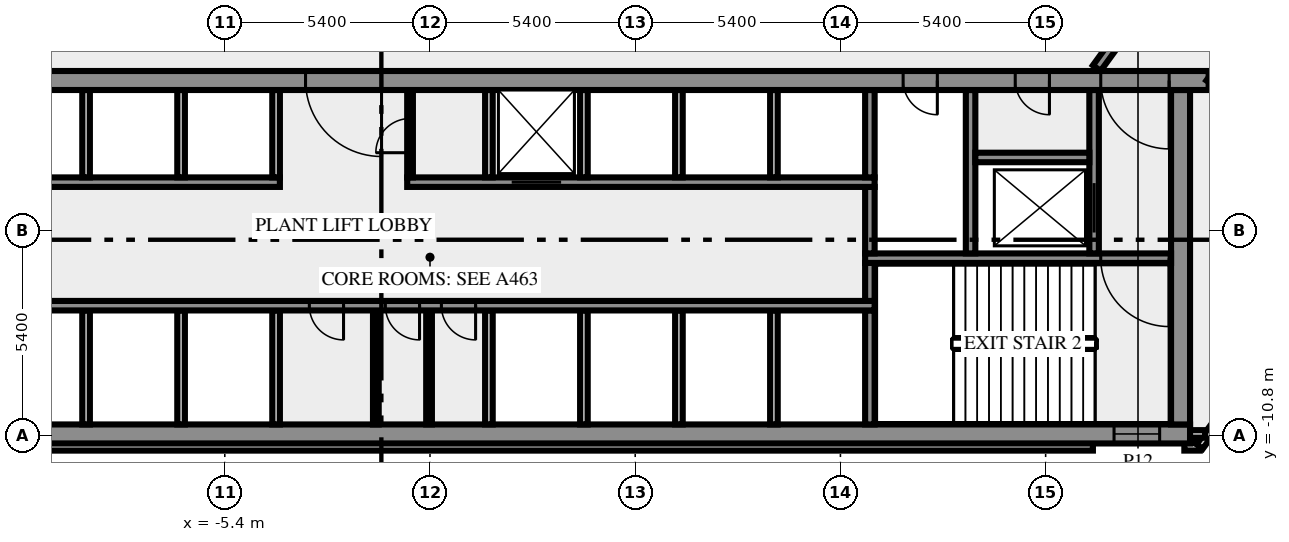
"""IFC4 building model, lengths in metres.
Left out: names, types, materials, properties, quantities, classifications, styles, units other than length and angle.
Written with IfcOpenShell. Run it as: python <this file> out.ifc"""

import sys

from ifc_helpers import new_model, si_unit, direction, frame, frame_2d, origin, place, context, subcontext, project, spatial, rectangle, extrude, element, fill, save


model = new_model("IFC4")
c1 = context("Model", 3, precision=1e-05, world=origin(), true_north=direction((0.0, 1.0)))
c2 = subcontext(c1, "Body", "Model", "MODEL_VIEW")
j1 = project(units=[si_unit("LENGTHUNIT", "METRE"), si_unit("PLANEANGLEUNIT", "RADIAN")], contexts=[c1])
p1 = place(None, origin())
s1 = spatial("IfcSite", under=j1, at=p1, CompositionType="ELEMENT")
p2 = place(p1, origin())
s2 = spatial("IfcBuilding", under=s1, at=p2, CompositionType="ELEMENT")
p3 = place(p2, frame((0.0, 0.0, 79.0)))
s3 = spatial("IfcBuildingStorey", under=s2, at=p3, CompositionType="ELEMENT", Elevation=79.0)
p4 = place(p3, frame((-17.444, -11.088, 0.0), z_axis=(0.0, 0.0, 1.0), x_axis=(1.0, 0.0, 0.0)))
e1 = element("IfcWall", 1, at=p4, inside=s3, PredefinedType="SOLIDWALL", context=c2, shape_type="SweptSolid", body=[
    extrude(rectangle(XDim=34.888, YDim=0.2, at=frame_2d((17.444, 0.0))), origin(), (0.0, 0.0, 1.0), 5.65),
])
p5 = place(p3, frame((19.85, -11.088, 0.0), z_axis=(0.0, 0.0, 1.0), x_axis=(1.0, 0.0, 0.0)))
e2 = element("IfcWall", 2, at=p5, inside=s3, PredefinedType="SOLIDWALL", context=c2, shape_type="SweptSolid", body=[
    extrude(rectangle(XDim=0.406, YDim=0.2, at=frame_2d((0.203, 0.0))), origin(), (0.0, 0.0, 1.0), 5.65),
])
p6 = place(p3, frame((20.253, -11.083, 0.0), z_axis=(0.0, 0.0, 1.0), x_axis=(0.587766567315, 0.809030569476, 0.0)))
e3 = element("IfcWall", 3, at=p6, inside=s3, PredefinedType="SOLIDWALL", context=c2, shape_type="SweptSolid", body=[
    extrude(rectangle(XDim=2.688, YDim=0.2, at=frame_2d((1.344, 0.0))), origin(), (0.0, 0.0, 1.0), 5.65),
])
p7 = place(p3, frame((19.98, -10.75, 0.0), z_axis=(0.0, 0.0, 1.0), x_axis=(1.0, 0.0, 0.0)))
e4 = element("IfcWall", 4, at=p7, inside=s3, PredefinedType="SOLIDWALL", context=c2, shape_type="SweptSolid", body=[
    extrude(rectangle(XDim=0.417, YDim=0.2, at=frame_2d((0.208, 0.0))), origin(), (0.0, 0.0, 1.0), 5.65),
])
p8 = place(p3, frame((-20.0, -10.75, 0.0), z_axis=(0.0, 0.0, 1.0), x_axis=(1.0, 0.0, 0.0)))
e5 = element("IfcWall", 5, at=p8, inside=s3, PredefinedType="SHEAR", context=c2, shape_type="SweptSolid", body=[
    extrude(rectangle(XDim=40.0, YDim=0.5, at=frame_2d((20.0, 0.0))), origin(), (0.0, 0.0, 1.0), 5.65),
])
p9 = place(p8, frame((0.8, 0.0, 1.0)))
e6 = element("IfcOpeningElement", 6, at=p9, cuts=e5, PredefinedType="OPENING", context=c2, shape_type="SweptSolid", body=[
    extrude(rectangle(XDim=1.2, YDim=1.2, at=frame_2d((0.6, 0.6))), frame((0.0, 0.26, 0.0), z_axis=(0.0, -1.0, 0.0), x_axis=(1.0, 0.0, 0.0)), (0.0, 0.0, 1.0), 0.52),
])
p10 = place(p8, frame((38.0, 0.0, 1.0)))
e7 = element("IfcOpeningElement", 7, at=p10, cuts=e5, PredefinedType="OPENING", context=c2, shape_type="SweptSolid", body=[
    extrude(rectangle(XDim=1.2, YDim=1.2, at=frame_2d((0.6, 0.6))), frame((0.0, 0.26, 0.0), z_axis=(0.0, -1.0, 0.0), x_axis=(1.0, 0.0, 0.0)), (0.0, 0.0, 1.0), 0.52),
])
for number, where, z_axis, x_axis in (
    (8, (-9.05, -10.5, 0.0), (0.0, 0.0, 1.0), (0.0, 1.0, 0.0)),
    (9, (-6.55, -10.5, 0.0), (0.0, 0.0, 1.0), (0.0, 1.0, 0.0)),
    (10, (-4.05, -10.5, 0.0), (0.0, 0.0, 1.0), (0.0, 1.0, 0.0)),
):
    element("IfcWall", number, at=place(p3, frame(where, z_axis=z_axis, x_axis=x_axis)), inside=s3, PredefinedType="SOLIDWALL", context=c2, shape_type="SweptSolid", body=[
        extrude(rectangle(XDim=3.0, YDim=0.2, at=frame_2d((1.5, 0.0))), origin(), (0.0, 0.0, 1.0), 5.65),
    ])
for number, where, z_axis, x_axis in (
    (11, (-1.425, -10.5, 0.0), (0.0, 0.0, 1.0), (0.0, 1.0, 0.0)),
    (12, (-0.025, -10.5, 0.0), (0.0, 0.0, 1.0), (0.0, 1.0, 0.0)),
):
    element("IfcWall", number, at=place(p3, frame(where, z_axis=z_axis, x_axis=x_axis)), inside=s3, PredefinedType="PARTITIONING", context=c2, shape_type="SweptSolid", body=[
        extrude(rectangle(XDim=3.0, YDim=0.15, at=frame_2d((1.5, 0.0))), origin(), (0.0, 0.0, 1.0), 5.65),
    ])
for number, where, z_axis, x_axis in (
    (13, (1.55, -10.5, 0.0), (0.0, 0.0, 1.0), (0.0, 1.0, 0.0)),
    (14, (4.05, -10.5, 0.0), (0.0, 0.0, 1.0), (0.0, 1.0, 0.0)),
    (15, (6.55, -10.5, 0.0), (0.0, 0.0, 1.0), (0.0, 1.0, 0.0)),
    (16, (9.05, -10.5, 0.0), (0.0, 0.0, 1.0), (0.0, 1.0, 0.0)),
):
    element("IfcWall", number, at=place(p3, frame(where, z_axis=z_axis, x_axis=x_axis)), inside=s3, PredefinedType="SOLIDWALL", context=c2, shape_type="SweptSolid", body=[
        extrude(rectangle(XDim=3.0, YDim=0.2, at=frame_2d((1.5, 0.0))), origin(), (0.0, 0.0, 1.0), 5.65),
    ])
p11 = place(p3, frame((11.575, -10.5, 0.0), z_axis=(0.0, 0.0, 1.0), x_axis=(0.0, 1.0, 0.0)))
e17 = element("IfcWall", 17, at=p11, inside=s3, PredefinedType="SHEAR", context=c2, shape_type="SweptSolid", body=[
    extrude(rectangle(XDim=3.0, YDim=0.25, at=frame_2d((1.5, 0.0))), origin(), (0.0, 0.0, 1.0), 5.65),
])
p12 = place(p3, frame((19.75, -10.5, 0.0), z_axis=(0.0, 0.0, 1.0), x_axis=(0.0, 1.0, 0.0)))
e18 = element("IfcWall", 18, at=p12, inside=s3, PredefinedType="SHEAR", context=c2, shape_type="SweptSolid", body=[
    extrude(rectangle(XDim=8.8, YDim=0.5, at=frame_2d((4.4, 0.0))), origin(), (0.0, 0.0, 1.0), 5.65),
])
p13 = place(p3, frame((11.7, -7.375, 0.0), z_axis=(0.0, 0.0, 1.0), x_axis=(-1.0, 0.0, 0.0)))
e19 = element("IfcWall", 19, at=p13, inside=s3, PredefinedType="SHEAR", context=c2, shape_type="SweptSolid", body=[
    extrude(rectangle(XDim=23.4, YDim=0.25, at=frame_2d((11.7, 0.0))), origin(), (0.0, 0.0, 1.0), 5.65),
])
p14 = place(p13, frame((13.975, 0.0, 0.0)))
e20 = element("IfcOpeningElement", 20, at=p14, cuts=e19, PredefinedType="OPENING", context=c2, shape_type="SweptSolid", body=[
    extrude(rectangle(XDim=0.9, YDim=2.1, at=frame_2d((0.45, 1.05))), frame((0.0, 0.135, 0.0), z_axis=(0.0, -1.0, 0.0), x_axis=(1.0, 0.0, 0.0)), (0.0, 0.0, 1.0), 0.27),
])
p15 = place(p13, frame((11.975, 0.0, 0.0)))
e21 = element("IfcOpeningElement", 21, at=p15, cuts=e19, PredefinedType="OPENING", context=c2, shape_type="SweptSolid", body=[
    extrude(rectangle(XDim=0.9, YDim=2.1, at=frame_2d((0.45, 1.05))), frame((0.0, 0.135, 0.0), z_axis=(0.0, -1.0, 0.0), x_axis=(1.0, 0.0, 0.0)), (0.0, 0.0, 1.0), 0.27),
])
p16 = place(p13, frame((10.5, 0.0, 0.0)))
e22 = element("IfcOpeningElement", 22, at=p16, cuts=e19, PredefinedType="OPENING", context=c2, shape_type="SweptSolid", body=[
    extrude(rectangle(XDim=0.9, YDim=2.1, at=frame_2d((0.45, 1.05))), frame((0.0, 0.135, 0.0), z_axis=(0.0, -1.0, 0.0), x_axis=(1.0, 0.0, 0.0)), (0.0, 0.0, 1.0), 0.27),
])
p17 = place(p3, frame((11.575, -7.25, 0.0), z_axis=(0.0, 0.0, 1.0), x_axis=(0.0, 1.0, 0.0)))
e23 = element("IfcWall", 23, at=p17, inside=s3, PredefinedType="SHEAR", context=c2, shape_type="SweptSolid", body=[
    extrude(rectangle(XDim=1.0, YDim=0.25, at=frame_2d((0.5, 0.0))), origin(), (0.0, 0.0, 1.0), 5.65),
])
p18 = place(p3, frame((19.5, -6.125, 0.0), z_axis=(0.0, 0.0, 1.0), x_axis=(-1.0, 0.0, 0.0)))
e24 = element("IfcWall", 24, at=p18, inside=s3, PredefinedType="SHEAR", context=c2, shape_type="SweptSolid", body=[
    extrude(rectangle(XDim=8.05, YDim=0.25, at=frame_2d((4.025, 0.0))), origin(), (0.0, 0.0, 1.0), 5.65),
])
p19 = place(p18, frame((0.05, 0.0, 0.0)))
e25 = element("IfcOpeningElement", 25, at=p19, cuts=e24, PredefinedType="OPENING", context=c2, shape_type="SweptSolid", body=[
    extrude(rectangle(XDim=1.8, YDim=2.1, at=frame_2d((0.9, 1.05))), frame((0.0, 0.135, 0.0), z_axis=(0.0, -1.0, 0.0), x_axis=(1.0, 0.0, 0.0)), (0.0, 0.0, 1.0), 0.27),
])
p20 = place(p3, frame((11.575, -6.0, 0.0), z_axis=(0.0, 0.0, 1.0), x_axis=(0.0, 1.0, 0.0)))
e26 = element("IfcWall", 26, at=p20, inside=s3, PredefinedType="SHEAR", context=c2, shape_type="SweptSolid", body=[
    extrude(rectangle(XDim=1.75, YDim=0.25, at=frame_2d((0.875, 0.0))), origin(), (0.0, 0.0, 1.0), 5.65),
])
p21 = place(p3, frame((14.225, -6.0, 0.0), z_axis=(0.0, 0.0, 1.0), x_axis=(0.0, 1.0, 0.0)))
e27 = element("IfcWall", 27, at=p21, inside=s3, PredefinedType="SHEAR", context=c2, shape_type="SweptSolid", body=[
    extrude(rectangle(XDim=4.3, YDim=0.25, at=frame_2d((2.15, 0.0))), origin(), (0.0, 0.0, 1.0), 5.65),
])
p22 = place(p3, frame((17.475, -6.0, 0.0), z_axis=(0.0, 0.0, 1.0), x_axis=(0.0, 1.0, 0.0)))
e28 = element("IfcWall", 28, at=p22, inside=s3, PredefinedType="SHEAR", context=c2, shape_type="SweptSolid", body=[
    extrude(rectangle(XDim=4.3, YDim=0.25, at=frame_2d((2.15, 0.0))), origin(), (0.0, 0.0, 1.0), 5.65),
])
p23 = place(p22, frame((0.55, 0.0, 0.0)))
e29 = element("IfcOpeningElement", 29, at=p23, cuts=e28, PredefinedType="OPENING", context=c2, shape_type="SweptSolid", body=[
    extrude(rectangle(XDim=1.3, YDim=2.1, at=frame_2d((0.65, 1.05))), frame((0.0, 0.135, 0.0), z_axis=(0.0, -1.0, 0.0), x_axis=(1.0, 0.0, 0.0)), (0.0, 0.0, 1.0), 0.27),
])
p24 = place(p3, frame((-11.7, -4.125, 0.0), z_axis=(0.0, 0.0, 1.0), x_axis=(1.0, 0.0, 0.0)))
e30 = element("IfcWall", 30, at=p24, inside=s3, PredefinedType="SHEAR", context=c2, shape_type="SweptSolid", body=[
    extrude(rectangle(XDim=7.75, YDim=0.25, at=frame_2d((3.875, 0.0))), origin(), (0.0, 0.0, 1.0), 5.65),
])
p25 = place(p3, frame((-0.6, -4.125, 0.0), z_axis=(0.0, 0.0, 1.0), x_axis=(1.0, 0.0, 0.0)))
e31 = element("IfcWall", 31, at=p25, inside=s3, PredefinedType="SHEAR", context=c2, shape_type="SweptSolid", body=[
    extrude(rectangle(XDim=12.3, YDim=0.25, at=frame_2d((6.15, 0.0))), origin(), (0.0, 0.0, 1.0), 5.65),
])
p26 = place(p25, frame((2.75, 0.0, 0.0)))
e32 = element("IfcOpeningElement", 32, at=p26, cuts=e31, PredefinedType="OPENING", context=c2, shape_type="SweptSolid", body=[
    extrude(rectangle(XDim=1.3, YDim=2.1, at=frame_2d((0.65, 1.05))), frame((0.0, 0.135, 0.0), z_axis=(0.0, -1.0, 0.0), x_axis=(1.0, 0.0, 0.0)), (0.0, 0.0, 1.0), 0.27),
])
for number, where, z_axis, x_axis in (
    (33, (-9.05, -4.0, 0.0), (0.0, 0.0, 1.0), (0.0, 1.0, 0.0)),
    (34, (-6.55, -4.0, 0.0), (0.0, 0.0, 1.0), (0.0, 1.0, 0.0)),
    (35, (-4.05, -4.0, 0.0), (0.0, 0.0, 1.0), (0.0, 1.0, 0.0)),
):
    element("IfcWall", number, at=place(p3, frame(where, z_axis=z_axis, x_axis=x_axis)), inside=s3, PredefinedType="SOLIDWALL", context=c2, shape_type="SweptSolid", body=[
        extrude(rectangle(XDim=2.3, YDim=0.2, at=frame_2d((1.15, 0.0))), origin(), (0.0, 0.0, 1.0), 5.65),
    ])
p27 = place(p3, frame((-0.525, -4.0, 0.0), z_axis=(0.0, 0.0, 1.0), x_axis=(0.0, 1.0, 0.0)))
e36 = element("IfcWall", 36, at=p27, inside=s3, PredefinedType="PARTITIONING", context=c2, shape_type="SweptSolid", body=[
    extrude(rectangle(XDim=2.3, YDim=0.15, at=frame_2d((1.15, 0.0))), origin(), (0.0, 0.0, 1.0), 5.65),
])
p28 = place(p27, frame((0.65, 0.0, 0.0)))
e37 = element("IfcOpeningElement", 37, at=p28, cuts=e36, PredefinedType="OPENING", context=c2, shape_type="SweptSolid", body=[
    extrude(rectangle(XDim=0.9, YDim=2.1, at=frame_2d((0.45, 1.05))), frame((0.0, 0.085, 0.0), z_axis=(0.0, -1.0, 0.0), x_axis=(1.0, 0.0, 0.0)), (0.0, 0.0, 1.0), 0.17),
])
for number, where, z_axis, x_axis in (
    (38, (1.55, -4.0, 0.0), (0.0, 0.0, 1.0), (0.0, 1.0, 0.0)),
    (39, (4.05, -4.0, 0.0), (0.0, 0.0, 1.0), (0.0, 1.0, 0.0)),
    (40, (6.55, -4.0, 0.0), (0.0, 0.0, 1.0), (0.0, 1.0, 0.0)),
    (41, (9.05, -4.0, 0.0), (0.0, 0.0, 1.0), (0.0, 1.0, 0.0)),
):
    element("IfcWall", number, at=place(p3, frame(where, z_axis=z_axis, x_axis=x_axis)), inside=s3, PredefinedType="SOLIDWALL", context=c2, shape_type="SweptSolid", body=[
        extrude(rectangle(XDim=2.3, YDim=0.2, at=frame_2d((1.15, 0.0))), origin(), (0.0, 0.0, 1.0), 5.65),
    ])
p29 = place(p3, frame((11.575, -4.0, 0.0), z_axis=(0.0, 0.0, 1.0), x_axis=(0.0, 1.0, 0.0)))
e42 = element("IfcWall", 42, at=p29, inside=s3, PredefinedType="SHEAR", context=c2, shape_type="SweptSolid", body=[
    extrude(rectangle(XDim=2.3, YDim=0.25, at=frame_2d((1.15, 0.0))), origin(), (0.0, 0.0, 1.0), 5.65),
])
p30 = place(p3, frame((14.35, -3.475, 0.0), z_axis=(0.0, 0.0, 1.0), x_axis=(1.0, 0.0, 0.0)))
e43 = element("IfcWall", 43, at=p30, inside=s3, PredefinedType="SHEAR", context=c2, shape_type="SweptSolid", body=[
    extrude(rectangle(XDim=3.0, YDim=0.25, at=frame_2d((1.5, 0.0))), origin(), (0.0, 0.0, 1.0), 5.65),
])
p31 = place(p3, frame((20.49, -1.45, 0.0), z_axis=(0.0, 0.0, 1.0), x_axis=(-1.0, 0.0, 0.0)))
e44 = element("IfcWall", 44, at=p31, inside=s3, PredefinedType="SHEAR", context=c2, shape_type="SweptSolid", body=[
    extrude(rectangle(XDim=40.98, YDim=0.5, at=frame_2d((20.49, 0.0))), origin(), (0.0, 0.0, 1.0), 5.65),
])
p32 = place(p31, frame((38.14, 0.0, 0.0)))
e45 = element("IfcOpeningElement", 45, at=p32, cuts=e44, PredefinedType="OPENING", context=c2, shape_type="SweptSolid", body=[
    extrude(rectangle(XDim=1.8, YDim=2.1, at=frame_2d((0.9, 1.05))), frame((0.0, 0.26, 0.0), z_axis=(0.0, -1.0, 0.0), x_axis=(1.0, 0.0, 0.0)), (0.0, 0.0, 1.0), 0.52),
])
p33 = place(p31, frame((36.728, 0.0, 0.0)))
e46 = element("IfcOpeningElement", 46, at=p33, cuts=e44, PredefinedType="OPENING", context=c2, shape_type="SweptSolid", body=[
    extrude(rectangle(XDim=0.8, YDim=2.1, at=frame_2d((0.4, 1.05))), frame((0.0, 0.26, 0.0), z_axis=(0.0, -1.0, 0.0), x_axis=(1.0, 0.0, 0.0)), (0.0, 0.0, 1.0), 0.52),
])
p34 = place(p31, frame((35.153, 0.0, 0.0)))
e47 = element("IfcOpeningElement", 47, at=p34, cuts=e44, PredefinedType="OPENING", context=c2, shape_type="SweptSolid", body=[
    extrude(rectangle(XDim=0.8, YDim=2.1, at=frame_2d((0.4, 1.05))), frame((0.0, 0.26, 0.0), z_axis=(0.0, -1.0, 0.0), x_axis=(1.0, 0.0, 0.0)), (0.0, 0.0, 1.0), 0.52),
])
p35 = place(p31, frame((32.94, 0.0, 0.0)))
e48 = element("IfcOpeningElement", 48, at=p35, cuts=e44, PredefinedType="OPENING", context=c2, shape_type="SweptSolid", body=[
    extrude(rectangle(XDim=0.9, YDim=2.1, at=frame_2d((0.45, 1.05))), frame((0.0, 0.26, 0.0), z_axis=(0.0, -1.0, 0.0), x_axis=(1.0, 0.0, 0.0)), (0.0, 0.0, 1.0), 0.52),
])
p36 = place(p31, frame((21.765, 0.0, 0.0)))
e49 = element("IfcOpeningElement", 49, at=p36, cuts=e44, PredefinedType="OPENING", context=c2, shape_type="SweptSolid", body=[
    extrude(rectangle(XDim=2.0, YDim=2.1, at=frame_2d((1.0, 1.05))), frame((0.0, 0.26, 0.0), z_axis=(0.0, -1.0, 0.0), x_axis=(1.0, 0.0, 0.0)), (0.0, 0.0, 1.0), 0.52),
])
p37 = place(p31, frame((7.14, 0.0, 0.0)))
e50 = element("IfcOpeningElement", 50, at=p37, cuts=e44, PredefinedType="OPENING", context=c2, shape_type="SweptSolid", body=[
    extrude(rectangle(XDim=0.9, YDim=2.1, at=frame_2d((0.45, 1.05))), frame((0.0, 0.26, 0.0), z_axis=(0.0, -1.0, 0.0), x_axis=(1.0, 0.0, 0.0)), (0.0, 0.0, 1.0), 0.52),
])
p38 = place(p31, frame((4.19, 0.0, 0.0)))
e51 = element("IfcOpeningElement", 51, at=p38, cuts=e44, PredefinedType="OPENING", context=c2, shape_type="SweptSolid", body=[
    extrude(rectangle(XDim=0.9, YDim=2.1, at=frame_2d((0.45, 1.05))), frame((0.0, 0.26, 0.0), z_axis=(0.0, -1.0, 0.0), x_axis=(1.0, 0.0, 0.0)), (0.0, 0.0, 1.0), 0.52),
])
p39 = place(p31, frame((1.04, 0.0, 0.0)))
e52 = element("IfcOpeningElement", 52, at=p39, cuts=e44, PredefinedType="OPENING", context=c2, shape_type="SweptSolid", body=[
    extrude(rectangle(XDim=1.8, YDim=2.1, at=frame_2d((0.9, 1.05))), frame((0.0, 0.26, 0.0), z_axis=(0.0, -1.0, 0.0), x_axis=(1.0, 0.0, 0.0)), (0.0, 0.0, 1.0), 0.52),
])
p40 = place(p3, frame((40.584, 26.078, 0.0), z_axis=(0.0, 0.0, 1.0), x_axis=(-0.587782727964, -0.809018828401, 0.0)))
e53 = element("IfcWall", 53, at=p40, inside=s3, PredefinedType="SOLIDWALL", context=c2, shape_type="SweptSolid", body=[
    extrude(rectangle(XDim=34.117, YDim=0.25, at=frame_2d((17.058, 0.0))), origin(), (0.0, 0.0, 1.0), 5.65),
])
p41 = place(p40, frame((22.951, 0.0, 0.0)))
e54 = element("IfcOpeningElement", 54, at=p41, cuts=e53, PredefinedType="OPENING", context=c2, shape_type="SweptSolid", body=[
    extrude(rectangle(XDim=1.2, YDim=2.1, at=frame_2d((0.6, 1.05))), frame((0.0, 0.135, 0.0), z_axis=(0.0, -1.0, 0.0), x_axis=(1.0, 0.0, 0.0)), (0.0, 0.0, 1.0), 0.27),
])
p42 = place(p40, frame((10.749, 0.0, 0.0)))
e55 = element("IfcOpeningElement", 55, at=p42, cuts=e53, PredefinedType="OPENING", context=c2, shape_type="SweptSolid", body=[
    extrude(rectangle(XDim=1.8, YDim=2.1, at=frame_2d((0.9, 1.05))), frame((0.0, 0.135, 0.0), z_axis=(0.0, -1.0, 0.0), x_axis=(1.0, 0.0, 0.0)), (0.0, 0.0, 1.0), 0.27),
])
p43 = place(p3, frame((17.545, -1.125, 0.0), z_axis=(0.0, 0.0, 1.0), x_axis=(0.587787785895, 0.809015153599, 0.0)))
e56 = element("IfcWall", 56, at=p43, inside=s3, PredefinedType="SOLIDWALL", context=c2, shape_type="SweptSolid", body=[
    extrude(rectangle(XDim=35.549, YDim=0.25, at=frame_2d((17.775, 0.0))), origin(), (0.0, 0.0, 1.0), 5.65),
])
p44 = place(p43, frame((33.303, 0.0, 0.0)))
e57 = element("IfcOpeningElement", 57, at=p44, cuts=e56, PredefinedType="OPENING", context=c2, shape_type="SweptSolid", body=[
    extrude(rectangle(XDim=1.2, YDim=2.1, at=frame_2d((0.6, 1.05))), frame((0.0, 0.135, 0.0), z_axis=(0.0, -1.0, 0.0), x_axis=(1.0, 0.0, 0.0)), (0.0, 0.0, 1.0), 0.27),
])
p45 = place(p43, frame((3.442, 0.0, 0.0)))
e58 = element("IfcOpeningElement", 58, at=p45, cuts=e56, PredefinedType="OPENING", context=c2, shape_type="SweptSolid", body=[
    extrude(rectangle(XDim=1.2, YDim=2.1, at=frame_2d((0.6, 1.05))), frame((0.0, 0.135, 0.0), z_axis=(0.0, -1.0, 0.0), x_axis=(1.0, 0.0, 0.0)), (0.0, 0.0, 1.0), 0.27),
])
p46 = place(p10, origin())
e59 = element("IfcWindow", 59, at=p46, inside=s3, PartitioningType="SINGLE_PANEL", PredefinedType="WINDOW", context=c2, shape_type="SweptSolid", body=[
    extrude(rectangle(XDim=1.2, YDim=1.2, at=frame_2d((0.6, 0.6))), frame((0.0, 0.03, 0.0), z_axis=(0.0, -1.0, 0.0), x_axis=(1.0, 0.0, 0.0)), (0.0, 0.0, 1.0), 0.06),
])
fill(e7, e59)
p47 = place(p14, origin())
e60 = element("IfcDoor", 60, at=p47, inside=s3, OperationType="SINGLE_SWING_RIGHT", PredefinedType="DOOR", context=c2, shape_type="SweptSolid", body=[
    extrude(rectangle(XDim=0.9, YDim=2.1, at=frame_2d((0.45, 1.05))), frame((0.0, 0.025, 0.0), z_axis=(0.0, -1.0, 0.0), x_axis=(1.0, 0.0, 0.0)), (0.0, 0.0, 1.0), 0.05),
])
fill(e20, e60)
p48 = place(p15, origin())
e61 = element("IfcDoor", 61, at=p48, inside=s3, OperationType="SINGLE_SWING_RIGHT", PredefinedType="DOOR", context=c2, shape_type="SweptSolid", body=[
    extrude(rectangle(XDim=0.9, YDim=2.1, at=frame_2d((0.45, 1.05))), frame((0.0, 0.025, 0.0), z_axis=(0.0, -1.0, 0.0), x_axis=(1.0, 0.0, 0.0)), (0.0, 0.0, 1.0), 0.05),
])
fill(e21, e61)
p49 = place(p16, origin())
e62 = element("IfcDoor", 62, at=p49, inside=s3, OperationType="SINGLE_SWING_LEFT", PredefinedType="DOOR", context=c2, shape_type="SweptSolid", body=[
    extrude(rectangle(XDim=0.9, YDim=2.1, at=frame_2d((0.45, 1.05))), frame((0.0, 0.025, 0.0), z_axis=(0.0, -1.0, 0.0), x_axis=(1.0, 0.0, 0.0)), (0.0, 0.0, 1.0), 0.05),
])
fill(e22, e62)
p50 = place(p19, origin())
e63 = element("IfcDoor", 63, at=p50, inside=s3, OperationType="DOUBLE_DOOR_SINGLE_SWING", PredefinedType="DOOR", context=c2, shape_type="SweptSolid", body=[
    extrude(rectangle(XDim=1.8, YDim=2.1, at=frame_2d((0.9, 1.05))), frame((0.0, 0.025, 0.0), z_axis=(0.0, -1.0, 0.0), x_axis=(1.0, 0.0, 0.0)), (0.0, 0.0, 1.0), 0.05),
])
fill(e25, e63)
p51 = place(p23, origin())
e64 = element("IfcDoor", 64, at=p51, inside=s3, OperationType="DOUBLE_DOOR_SLIDING", PredefinedType="DOOR", context=c2, shape_type="SweptSolid", body=[
    extrude(rectangle(XDim=1.3, YDim=2.1, at=frame_2d((0.65, 1.05))), frame((0.0, 0.025, 0.0), z_axis=(0.0, -1.0, 0.0), x_axis=(1.0, 0.0, 0.0)), (0.0, 0.0, 1.0), 0.05),
])
fill(e29, e64)
p52 = place(p26, origin())
e65 = element("IfcDoor", 65, at=p52, inside=s3, OperationType="DOUBLE_DOOR_SLIDING", PredefinedType="DOOR", context=c2, shape_type="SweptSolid", body=[
    extrude(rectangle(XDim=1.3, YDim=2.1, at=frame_2d((0.65, 1.05))), frame((0.0, 0.025, 0.0), z_axis=(0.0, -1.0, 0.0), x_axis=(1.0, 0.0, 0.0)), (0.0, 0.0, 1.0), 0.05),
])
fill(e32, e65)
p53 = place(p28, origin())
e66 = element("IfcDoor", 66, at=p53, inside=s3, OperationType="SINGLE_SWING_LEFT", PredefinedType="DOOR", context=c2, shape_type="SweptSolid", body=[
    extrude(rectangle(XDim=0.9, YDim=2.1, at=frame_2d((0.45, 1.05))), frame((0.0, 0.025, 0.0), z_axis=(0.0, -1.0, 0.0), x_axis=(1.0, 0.0, 0.0)), (0.0, 0.0, 1.0), 0.05),
])
fill(e37, e66)
p54 = place(p36, origin())
e67 = element("IfcDoor", 67, at=p54, inside=s3, OperationType="DOUBLE_DOOR_SINGLE_SWING", PredefinedType="DOOR", context=c2, shape_type="SweptSolid", body=[
    extrude(rectangle(XDim=2.0, YDim=2.1, at=frame_2d((1.0, 1.05))), frame((0.0, 0.025, 0.0), z_axis=(0.0, -1.0, 0.0), x_axis=(1.0, 0.0, 0.0)), (0.0, 0.0, 1.0), 0.05),
])
fill(e49, e67)
p55 = place(p37, origin())
e68 = element("IfcDoor", 68, at=p55, inside=s3, OperationType="SINGLE_SWING_LEFT", PredefinedType="DOOR", context=c2, shape_type="SweptSolid", body=[
    extrude(rectangle(XDim=0.9, YDim=2.1, at=frame_2d((0.45, 1.05))), frame((0.0, 0.025, 0.0), z_axis=(0.0, -1.0, 0.0), x_axis=(1.0, 0.0, 0.0)), (0.0, 0.0, 1.0), 0.05),
])
fill(e50, e68)
p56 = place(p38, origin())
e69 = element("IfcDoor", 69, at=p56, inside=s3, OperationType="SINGLE_SWING_LEFT", PredefinedType="DOOR", context=c2, shape_type="SweptSolid", body=[
    extrude(rectangle(XDim=0.9, YDim=2.1, at=frame_2d((0.45, 1.05))), frame((0.0, 0.025, 0.0), z_axis=(0.0, -1.0, 0.0), x_axis=(1.0, 0.0, 0.0)), (0.0, 0.0, 1.0), 0.05),
])
fill(e51, e69)
p57 = place(p39, origin())
e70 = element("IfcDoor", 70, at=p57, inside=s3, OperationType="DOUBLE_DOOR_SINGLE_SWING", PredefinedType="DOOR", context=c2, shape_type="SweptSolid", body=[
    extrude(rectangle(XDim=1.8, YDim=2.1, at=frame_2d((0.9, 1.05))), frame((0.0, 0.025, 0.0), z_axis=(0.0, -1.0, 0.0), x_axis=(1.0, 0.0, 0.0)), (0.0, 0.0, 1.0), 0.05),
])
fill(e52, e70)
save(model, sys.argv[1])
